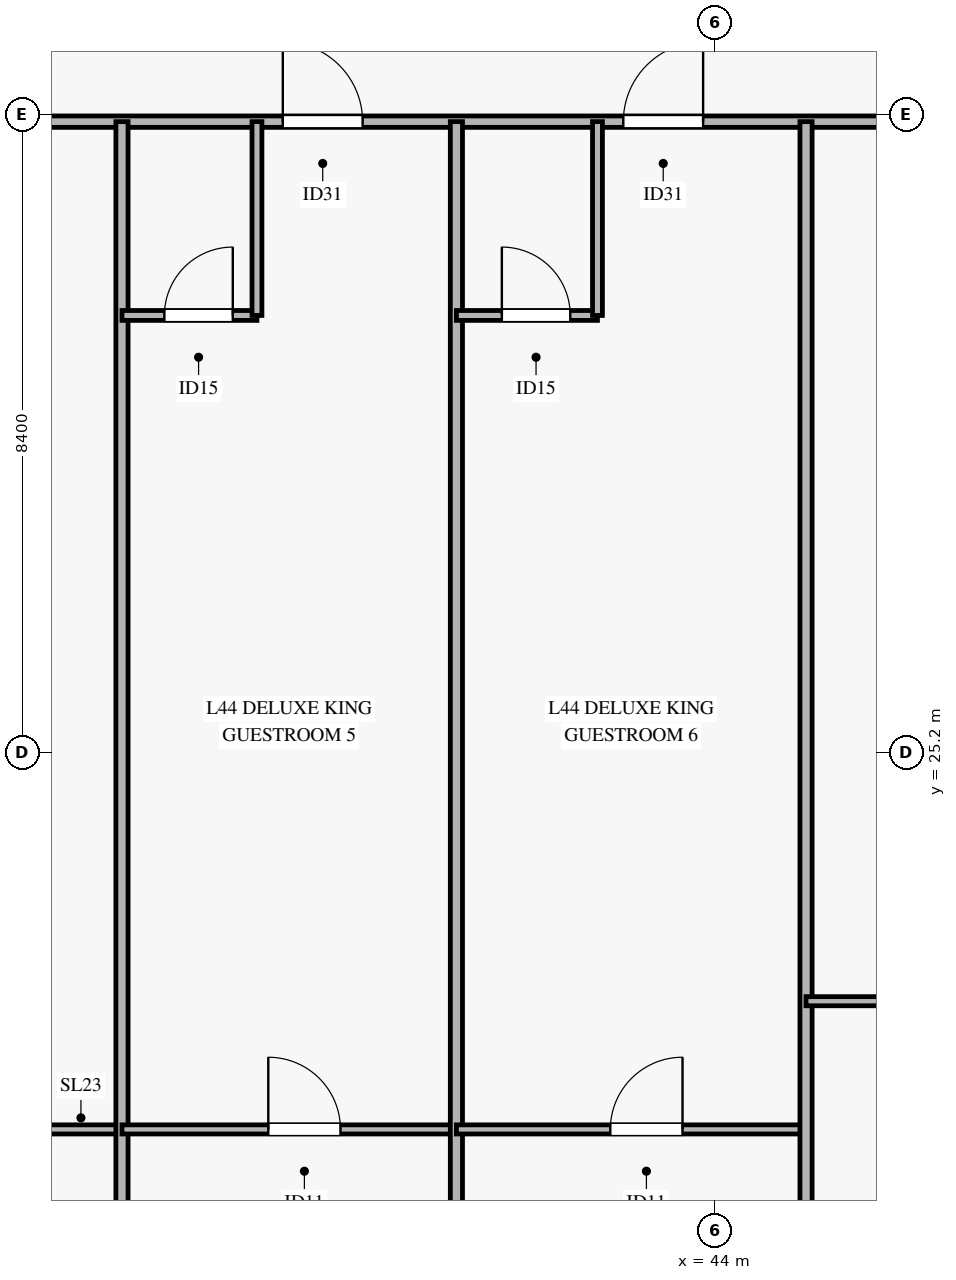
"""IFC4 building model, lengths in metres.
Left out: names, types, materials, properties, quantities, classifications, styles, units other than length and angle.
Written with IfcOpenShell. Run it as: python <this file> out.ifc"""

import sys

from ifc_helpers import new_model, si_unit, direction, frame, frame_2d, origin, place, context, subcontext, project, spatial, rectangle, extrude, source, transform, mapped, element, fill, save


model = new_model("IFC4")
c1 = context("Model", 3, precision=1e-05, world=origin(), true_north=direction((0.0, 1.0)))
c2 = subcontext(c1, "Body", "Model", "MODEL_VIEW")
j1 = project(units=[si_unit("LENGTHUNIT", "METRE"), si_unit("PLANEANGLEUNIT", "RADIAN")], contexts=[c1])
p1 = place(None, origin())
s1 = spatial("IfcSite", under=j1, at=p1, CompositionType="ELEMENT")
p2 = place(p1, origin())
s2 = spatial("IfcBuilding", under=s1, at=p2, CompositionType="ELEMENT")
p3 = place(p2, frame((0.0, 0.0, 177.2)))
s3 = spatial("IfcBuildingStorey", under=s2, at=p3, CompositionType="ELEMENT", Elevation=177.2)
p4 = place(p3, frame((5.919, 33.5, 0.0), z_axis=(0.0, 0.0, 1.0), x_axis=(1.0, 0.0, 0.0)))
e1 = element("IfcWall", 1, at=p4, inside=s3, PredefinedType="PARTITIONING", context=c2, shape_type="SweptSolid", body=[
    extrude(rectangle(XDim=58.562, YDim=0.15, at=frame_2d((29.281, 0.0))), origin(), (0.0, 0.0, 1.0), 2.455),
])
p5 = place(p4, frame((6.36, 0.0, 0.0)))
e2 = element("IfcOpeningElement", 2, at=p5, cuts=e1, PredefinedType="OPENING", context=c2, shape_type="SweptSolid", body=[
    extrude(rectangle(XDim=1.05, YDim=2.15, at=frame_2d((0.525, 1.075))), frame((0.0, 0.085, 0.0), z_axis=(0.0, -1.0, 0.0), x_axis=(1.0, 0.0, 0.0)), (0.0, 0.0, 1.0), 0.17),
])
p6 = place(p4, frame((17.992, 0.0, 0.0)))
e3 = element("IfcOpeningElement", 3, at=p6, cuts=e1, PredefinedType="OPENING", context=c2, shape_type="SweptSolid", body=[
    extrude(rectangle(XDim=1.05, YDim=2.15, at=frame_2d((0.525, 1.075))), frame((0.0, 0.085, 0.0), z_axis=(0.0, -1.0, 0.0), x_axis=(1.0, 0.0, 0.0)), (0.0, 0.0, 1.0), 0.17),
])
p7 = place(p4, frame((23.322, 0.0, 0.0)))
e4 = element("IfcOpeningElement", 4, at=p7, cuts=e1, PredefinedType="OPENING", context=c2, shape_type="SweptSolid", body=[
    extrude(rectangle(XDim=1.05, YDim=2.15, at=frame_2d((0.525, 1.075))), frame((0.0, 0.085, 0.0), z_axis=(0.0, -1.0, 0.0), x_axis=(1.0, 0.0, 0.0)), (0.0, 0.0, 1.0), 0.17),
])
p8 = place(p4, frame((27.997, 0.0, 0.0)))
e5 = element("IfcOpeningElement", 5, at=p8, cuts=e1, PredefinedType="OPENING", context=c2, shape_type="SweptSolid", body=[
    extrude(rectangle(XDim=1.05, YDim=2.15, at=frame_2d((0.525, 1.075))), frame((0.0, 0.085, 0.0), z_axis=(0.0, -1.0, 0.0), x_axis=(1.0, 0.0, 0.0)), (0.0, 0.0, 1.0), 0.17),
])
p9 = place(p4, frame((32.397, 0.0, 0.0)))
e6 = element("IfcOpeningElement", 6, at=p9, cuts=e1, PredefinedType="OPENING", context=c2, shape_type="SweptSolid", body=[
    extrude(rectangle(XDim=1.05, YDim=2.15, at=frame_2d((0.525, 1.075))), frame((0.0, 0.085, 0.0), z_axis=(0.0, -1.0, 0.0), x_axis=(1.0, 0.0, 0.0)), (0.0, 0.0, 1.0), 0.17),
])
p10 = place(p4, frame((36.877, 0.0, 0.0)))
e7 = element("IfcOpeningElement", 7, at=p10, cuts=e1, PredefinedType="OPENING", context=c2, shape_type="SweptSolid", body=[
    extrude(rectangle(XDim=1.05, YDim=2.15, at=frame_2d((0.525, 1.075))), frame((0.0, 0.085, 0.0), z_axis=(0.0, -1.0, 0.0), x_axis=(1.0, 0.0, 0.0)), (0.0, 0.0, 1.0), 0.17),
])
p11 = place(p4, frame((46.612, 0.0, 0.0)))
e8 = element("IfcOpeningElement", 8, at=p11, cuts=e1, PredefinedType="OPENING", context=c2, shape_type="SweptSolid", body=[
    extrude(rectangle(XDim=1.05, YDim=2.15, at=frame_2d((0.525, 1.075))), frame((0.0, 0.085, 0.0), z_axis=(0.0, -1.0, 0.0), x_axis=(1.0, 0.0, 0.0)), (0.0, 0.0, 1.0), 0.17),
])
p12 = place(p3, frame((31.8, 20.24, 0.0), z_axis=(0.0, 0.0, 1.0), x_axis=(1.0, 0.0, 0.0)))
e9 = element("IfcWall", 9, at=p12, inside=s3, PredefinedType="PARTITIONING", context=c2, shape_type="SweptSolid", body=[
    extrude(rectangle(XDim=4.4, YDim=0.12, at=frame_2d((2.2, 0.0))), origin(), (0.0, 0.0, 1.0), 3.27),
])
p13 = place(p12, frame((1.925, 0.0, 0.0)))
e10 = element("IfcOpeningElement", 10, at=p13, cuts=e9, PredefinedType="OPENING", context=c2, shape_type="SweptSolid", body=[
    extrude(rectangle(XDim=0.95, YDim=2.1, at=frame_2d((0.475, 1.05))), frame((0.0, 0.07, 0.0), z_axis=(0.0, -1.0, 0.0), x_axis=(1.0, 0.0, 0.0)), (0.0, 0.0, 1.0), 0.14),
])
p14 = place(p3, frame((36.2, 9.626, 0.0), z_axis=(0.0, 0.0, 1.0), x_axis=(0.0, 1.0, 0.0)))
e11 = element("IfcWall", 11, at=p14, inside=s3, PredefinedType="PARTITIONING", context=c2, shape_type="SweptSolid", body=[
    extrude(rectangle(XDim=23.874, YDim=0.16, at=frame_2d((11.937, 0.0))), origin(), (0.0, 0.0, 1.0), 2.755),
])
p15 = place(p3, frame((36.2, 30.95, 0.0), z_axis=(0.0, 0.0, 1.0), x_axis=(1.0, 0.0, 0.0)))
e12 = element("IfcWall", 12, at=p15, inside=s3, PredefinedType="PARTITIONING", context=c2, shape_type="SweptSolid", body=[
    extrude(rectangle(XDim=1.776, YDim=0.13, at=frame_2d((0.888, 0.0))), origin(), (0.0, 0.0, 1.0), 2.455),
])
p16 = place(p15, frame((0.558, 0.0, 0.0)))
e13 = element("IfcOpeningElement", 13, at=p16, cuts=e12, PredefinedType="OPENING", context=c2, shape_type="SweptSolid", body=[
    extrude(rectangle(XDim=0.9, YDim=2.1, at=frame_2d((0.45, 1.05))), frame((0.0, 0.075, 0.0), z_axis=(0.0, -1.0, 0.0), x_axis=(1.0, 0.0, 0.0)), (0.0, 0.0, 1.0), 0.15),
])
p17 = place(p3, frame((37.976, 30.95, 0.0), z_axis=(0.0, 0.0, 1.0), x_axis=(0.0, 1.0, 0.0)))
e14 = element("IfcWall", 14, at=p17, inside=s3, PredefinedType="PARTITIONING", context=c2, shape_type="SweptSolid", body=[
    extrude(rectangle(XDim=2.55, YDim=0.13, at=frame_2d((1.275, 0.0))), origin(), (0.0, 0.0, 1.0), 2.805),
])
p18 = place(p3, frame((36.2, 20.24, 0.0), z_axis=(0.0, 0.0, 1.0), x_axis=(1.0, 0.0, 0.0)))
e15 = element("IfcWall", 15, at=p18, inside=s3, PredefinedType="PARTITIONING", context=c2, shape_type="SweptSolid", body=[
    extrude(rectangle(XDim=4.4, YDim=0.12, at=frame_2d((2.2, 0.0))), origin(), (0.0, 0.0, 1.0), 2.455),
])
p19 = place(p18, frame((1.925, 0.0, 0.0)))
e16 = element("IfcOpeningElement", 16, at=p19, cuts=e15, PredefinedType="OPENING", context=c2, shape_type="SweptSolid", body=[
    extrude(rectangle(XDim=0.95, YDim=2.1, at=frame_2d((0.475, 1.05))), frame((0.0, 0.07, 0.0), z_axis=(0.0, -1.0, 0.0), x_axis=(1.0, 0.0, 0.0)), (0.0, 0.0, 1.0), 0.14),
])
p20 = place(p3, frame((40.6, 9.626, 0.0), z_axis=(0.0, 0.0, 1.0), x_axis=(0.0, 1.0, 0.0)))
e17 = element("IfcWall", 17, at=p20, inside=s3, PredefinedType="PARTITIONING", context=c2, shape_type="SweptSolid", body=[
    extrude(rectangle(XDim=23.874, YDim=0.16, at=frame_2d((11.937, 0.0))), origin(), (0.0, 0.0, 1.0), 2.755),
])
p21 = place(p3, frame((40.6, 30.95, 0.0), z_axis=(0.0, 0.0, 1.0), x_axis=(1.0, 0.0, 0.0)))
e18 = element("IfcWall", 18, at=p21, inside=s3, PredefinedType="PARTITIONING", context=c2, shape_type="SweptSolid", body=[
    extrude(rectangle(XDim=1.856, YDim=0.13, at=frame_2d((0.928, 0.0))), origin(), (0.0, 0.0, 1.0), 3.27),
])
p22 = place(p21, frame((0.598, 0.0, 0.0)))
e19 = element("IfcOpeningElement", 19, at=p22, cuts=e18, PredefinedType="OPENING", context=c2, shape_type="SweptSolid", body=[
    extrude(rectangle(XDim=0.9, YDim=2.1, at=frame_2d((0.45, 1.05))), frame((0.0, 0.075, 0.0), z_axis=(0.0, -1.0, 0.0), x_axis=(1.0, 0.0, 0.0)), (0.0, 0.0, 1.0), 0.15),
])
p23 = place(p3, frame((42.456, 30.95, 0.0), z_axis=(0.0, 0.0, 1.0), x_axis=(0.0, 1.0, 0.0)))
e20 = element("IfcWall", 20, at=p23, inside=s3, PredefinedType="PARTITIONING", context=c2, shape_type="SweptSolid", body=[
    extrude(rectangle(XDim=2.55, YDim=0.13, at=frame_2d((1.275, 0.0))), origin(), (0.0, 0.0, 1.0), 2.805),
])
p24 = place(p3, frame((40.6, 20.24, 0.0), z_axis=(0.0, 0.0, 1.0), x_axis=(1.0, 0.0, 0.0)))
e21 = element("IfcWall", 21, at=p24, inside=s3, PredefinedType="PARTITIONING", context=c2, shape_type="SweptSolid", body=[
    extrude(rectangle(XDim=4.6, YDim=0.12, at=frame_2d((2.3, 0.0))), origin(), (0.0, 0.0, 1.0), 2.455),
])
p25 = place(p24, frame((2.025, 0.0, 0.0)))
e22 = element("IfcOpeningElement", 22, at=p25, cuts=e21, PredefinedType="OPENING", context=c2, shape_type="SweptSolid", body=[
    extrude(rectangle(XDim=0.95, YDim=2.1, at=frame_2d((0.475, 1.05))), frame((0.0, 0.07, 0.0), z_axis=(0.0, -1.0, 0.0), x_axis=(1.0, 0.0, 0.0)), (0.0, 0.0, 1.0), 0.14),
])
p26 = place(p3, frame((45.2, 9.626, 0.0), z_axis=(0.0, 0.0, 1.0), x_axis=(0.0, 1.0, 0.0)))
e23 = element("IfcWall", 23, at=p26, inside=s3, PredefinedType="PARTITIONING", context=c2, shape_type="SweptSolid", body=[
    extrude(rectangle(XDim=23.874, YDim=0.16, at=frame_2d((11.937, 0.0))), origin(), (0.0, 0.0, 1.0), 2.755),
])
p27 = place(p3, frame((45.2, 21.927, 0.0), z_axis=(0.0, 0.0, 1.0), x_axis=(1.0, 0.0, 0.0)))
e24 = element("IfcWall", 24, at=p27, inside=s3, PredefinedType="PARTITIONING", context=c2, shape_type="SweptSolid", body=[
    extrude(rectangle(XDim=19.281, YDim=0.12, at=frame_2d((9.641, 0.0))), origin(), (0.0, 0.0, 1.0), 2.455),
])
p28 = place(p27, frame((7.705, 0.0, 0.0)))
e25 = element("IfcOpeningElement", 25, at=p28, cuts=e24, PredefinedType="OPENING", context=c2, shape_type="SweptSolid", body=[
    extrude(rectangle(XDim=0.95, YDim=2.1, at=frame_2d((0.475, 1.05))), frame((0.0, 0.07, 0.0), z_axis=(0.0, -1.0, 0.0), x_axis=(1.0, 0.0, 0.0)), (0.0, 0.0, 1.0), 0.14),
])
m1 = source(origin(), c2, "Body", "SweptSolid", [
    extrude(rectangle(XDim=1.05, YDim=2.15, at=frame_2d((0.525, 1.075))), frame((0.0, 0.025, 0.0), z_axis=(0.0, -1.0, 0.0), x_axis=(1.0, 0.0, 0.0)), (0.0, 0.0, 1.0), 0.05),
])
p29 = place(p9, origin())
e26 = element("IfcDoor", 26, at=p29, inside=s3, OperationType="SINGLE_SWING_LEFT", PredefinedType="DOOR", context=c2, shape_type="MappedRepresentation", body=[
    mapped(m1, transform((0.0, 0.0, 0.0), x_axis=(1.0, 0.0, 0.0), y_axis=(0.0, 1.0, 0.0), z_axis=(0.0, 0.0, 1.0), scale=1.0)),
])
fill(e6, e26)
m2 = source(origin(), c2, "Body", "SweptSolid", [
    extrude(rectangle(XDim=0.9, YDim=2.1, at=frame_2d((0.45, 1.05))), frame((0.0, 0.025, 0.0), z_axis=(0.0, -1.0, 0.0), x_axis=(1.0, 0.0, 0.0)), (0.0, 0.0, 1.0), 0.05),
])
p30 = place(p16, origin())
e27 = element("IfcDoor", 27, at=p30, inside=s3, OperationType="SINGLE_SWING_RIGHT", PredefinedType="DOOR", context=c2, shape_type="MappedRepresentation", body=[
    mapped(m2, transform((0.0, 0.0, 0.0), x_axis=(1.0, 0.0, 0.0), y_axis=(0.0, 1.0, 0.0), z_axis=(0.0, 0.0, 1.0), scale=1.0)),
])
fill(e13, e27)
m3 = source(origin(), c2, "Body", "SweptSolid", [
    extrude(rectangle(XDim=0.95, YDim=2.1, at=frame_2d((0.475, 1.05))), frame((0.0, 0.025, 0.0), z_axis=(0.0, -1.0, 0.0), x_axis=(1.0, 0.0, 0.0)), (0.0, 0.0, 1.0), 0.05),
])
p31 = place(p19, origin())
e28 = element("IfcDoor", 28, at=p31, inside=s3, OperationType="SINGLE_SWING_LEFT", PredefinedType="DOOR", context=c2, shape_type="MappedRepresentation", body=[
    mapped(m3, transform((0.0, 0.0, 0.0), x_axis=(1.0, 0.0, 0.0), y_axis=(0.0, 1.0, 0.0), z_axis=(0.0, 0.0, 1.0), scale=1.0)),
])
fill(e16, e28)
p32 = place(p10, origin())
e29 = element("IfcDoor", 29, at=p32, inside=s3, OperationType="SINGLE_SWING_RIGHT", PredefinedType="DOOR", context=c2, shape_type="MappedRepresentation", body=[
    mapped(m1, transform((0.0, 0.0, 0.0), x_axis=(1.0, 0.0, 0.0), y_axis=(0.0, 1.0, 0.0), z_axis=(0.0, 0.0, 1.0), scale=1.0)),
])
fill(e7, e29)
p33 = place(p22, origin())
e30 = element("IfcDoor", 30, at=p33, inside=s3, OperationType="SINGLE_SWING_LEFT", PredefinedType="DOOR", context=c2, shape_type="MappedRepresentation", body=[
    mapped(m2, transform((0.0, 0.0, 0.0), x_axis=(1.0, 0.0, 0.0), y_axis=(0.0, 1.0, 0.0), z_axis=(0.0, 0.0, 1.0), scale=1.0)),
])
fill(e19, e30)
p34 = place(p25, origin())
e31 = element("IfcDoor", 31, at=p34, inside=s3, OperationType="SINGLE_SWING_RIGHT", PredefinedType="DOOR", context=c2, shape_type="MappedRepresentation", body=[
    mapped(m3, transform((0.0, 0.0, 0.0), x_axis=(1.0, 0.0, 0.0), y_axis=(0.0, 1.0, 0.0), z_axis=(0.0, 0.0, 1.0), scale=1.0)),
])
fill(e22, e31)
save(model, sys.argv[1])
